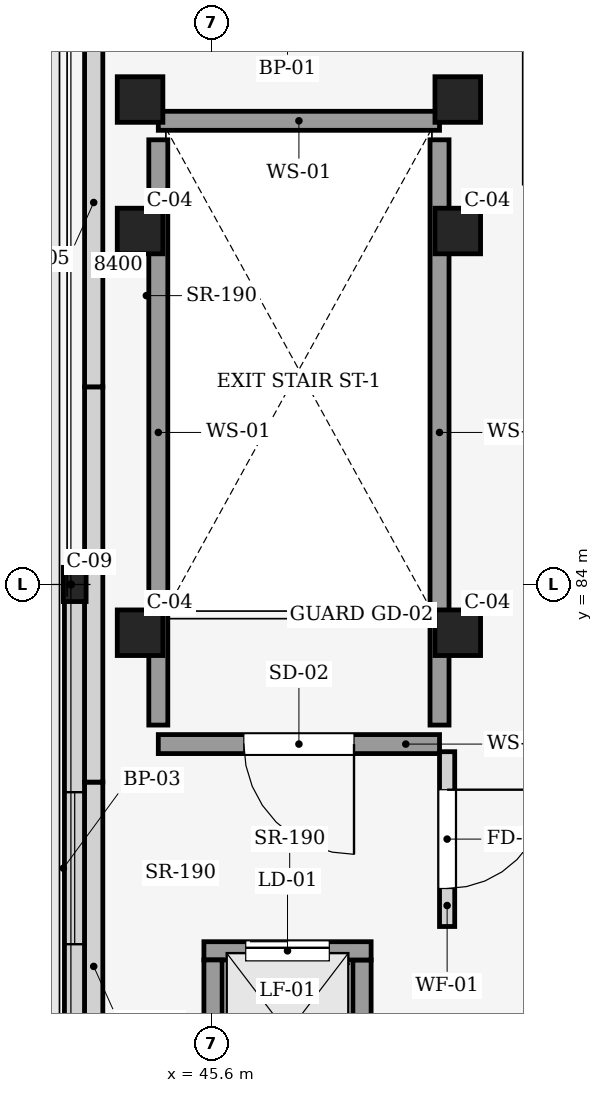
"""IFC4 building model, lengths in metres.
Left out: names, types, materials, properties, quantities, classifications, styles, units other than length and angle.
Written with IfcOpenShell. Run it as: python <this file> out.ifc"""

import sys

from ifc_helpers import new_model, si_unit, direction, frame, frame_2d, origin, origin_2d, place, context, subcontext, project, spatial, rectangle, i_section, extrude, element, fill, save


model = new_model("IFC4")
c1 = context("Model", 3, precision=1e-05, world=origin(), true_north=direction((0.0, 1.0)))
c2 = subcontext(c1, "Body", "Model", "MODEL_VIEW")
j1 = project(units=[si_unit("LENGTHUNIT", "METRE"), si_unit("PLANEANGLEUNIT", "RADIAN")], contexts=[c1])
p1 = place(None, origin())
s1 = spatial("IfcSite", under=j1, at=p1, CompositionType="ELEMENT")
p2 = place(p1, origin())
s2 = spatial("IfcBuilding", under=s1, at=p2, CompositionType="ELEMENT")
p3 = place(p2, frame((0.0, 0.0, 29.4)))
s3 = spatial("IfcBuildingStorey", under=s2, at=p3, CompositionType="ELEMENT", Elevation=29.4)
p4 = place(p3, frame((43.8, 84.0, 0.0), z_axis=(0.0, 0.0, 1.0), x_axis=(1.0, 0.0, 0.0)))
e1 = element("IfcColumn", 1, at=p4, inside=s3, PredefinedType="COLUMN", context=c2, shape_type="SweptSolid", body=[
    extrude(i_section(OverallWidth=0.3, OverallDepth=0.45, WebThickness=0.014, FlangeThickness=0.026, at=origin_2d()), origin(), (0.0, 0.0, 1.0), 9.96),
])
for number, where, z_axis, x_axis in (
    (2, (48.84, 83.365, 0.0), (0.0, 0.0, 1.0), (1.0, 0.0, 0.0)),
    (3, (44.66, 83.365, 0.0), (0.0, 0.0, 1.0), (1.0, 0.0, 0.0)),
    (4, (48.84, 88.65, 0.0), (0.0, 0.0, 1.0), (1.0, 0.0, 0.0)),
    (5, (44.66, 88.65, 0.0), (0.0, 0.0, 1.0), (1.0, 0.0, 0.0)),
    (6, (48.84, 90.38, 0.0), (0.0, 0.0, 1.0), (1.0, 0.0, 0.0)),
    (7, (44.66, 90.38, 0.0), (0.0, 0.0, 1.0), (1.0, 0.0, 0.0)),
):
    element("IfcColumn", number, at=place(p3, frame(where, z_axis=z_axis, x_axis=x_axis)), inside=s3, PredefinedType="COLUMN", context=c2, shape_type="SweptSolid", body=[
        extrude(rectangle(XDim=0.6, YDim=0.6, at=origin_2d()), origin(), (0.0, 0.0, 1.0), 4.75),
    ])
p5 = place(p3, frame((43.8, 76.685, 0.0), z_axis=(0.0, 0.0, 1.0), x_axis=(0.0, 1.0, 0.0)))
e8 = element("IfcWall", 8, at=p5, inside=s3, PredefinedType="STANDARD", context=c2, shape_type="SweptSolid", body=[
    extrude(rectangle(XDim=7.165, YDim=0.27, at=frame_2d((3.583, 0.0))), origin(), (0.0, 0.0, 1.0), 4.425),
])
p6 = place(p5, frame((2.582, 0.0, 0.85)))
e9 = element("IfcOpeningElement", 9, at=p6, cuts=e8, PredefinedType="OPENING", context=c2, shape_type="SweptSolid", body=[
    extrude(rectangle(XDim=2.0, YDim=1.85, at=frame_2d((1.0, 0.925))), frame((0.0, 0.145, 0.0), z_axis=(0.0, -1.0, 0.0), x_axis=(1.0, 0.0, 0.0)), (0.0, 0.0, 1.0), 0.29),
])
p7 = place(p3, frame((44.05, 76.55, 4.7), z_axis=(0.0, 0.0, 1.0), x_axis=(0.0, 1.0, 0.0)))
e10 = element("IfcWall", 10, at=p7, inside=s3, PredefinedType="STANDARD", context=c2, shape_type="SweptSolid", body=[
    extrude(rectangle(XDim=4.85, YDim=0.24, at=frame_2d((2.425, 0.0))), origin(), (0.0, 0.0, 1.0), 3.8),
])
p8 = place(p3, frame((44.05, 81.4, 4.7), z_axis=(0.0, 0.0, 1.0), x_axis=(0.0, 1.0, 0.0)))
e11 = element("IfcWall", 11, at=p8, inside=s3, PredefinedType="STANDARD", context=c2, shape_type="SweptSolid", body=[
    extrude(rectangle(XDim=5.2, YDim=0.24, at=frame_2d((2.6, 0.0))), origin(), (0.0, 0.0, 1.0), 4.85),
])
p9 = place(p3, frame((44.05, 86.6, 4.7), z_axis=(0.0, 0.0, 1.0), x_axis=(0.0, 1.0, 0.0)))
e12 = element("IfcWall", 12, at=p9, inside=s3, PredefinedType="STANDARD", context=c2, shape_type="SweptSolid", body=[
    extrude(rectangle(XDim=4.85, YDim=0.24, at=frame_2d((2.425, 0.0))), origin(), (0.0, 0.0, 1.0), 3.8),
])
p10 = place(p3, frame((48.6, 81.9, 0.0), z_axis=(0.0, 0.0, 1.0), x_axis=(-1.0, 0.0, 0.0)))
e13 = element("IfcWall", 13, at=p10, inside=s3, PredefinedType="SHEAR", context=c2, shape_type="SweptSolid", body=[
    extrude(rectangle(XDim=3.7, YDim=0.25, at=frame_2d((1.85, 0.0))), origin(), (0.0, 0.0, 1.0), 4.75),
])
p11 = place(p10, frame((1.125, 0.0, 0.0)))
e14 = element("IfcOpeningElement", 14, at=p11, cuts=e13, PredefinedType="OPENING", context=c2, shape_type="SweptSolid", body=[
    extrude(rectangle(XDim=1.45, YDim=2.2, at=frame_2d((0.725, 1.1))), frame((0.0, 0.135, 0.0), z_axis=(0.0, -1.0, 0.0), x_axis=(1.0, 0.0, 0.0)), (0.0, 0.0, 1.0), 0.27),
])
p12 = place(p3, frame((44.9, 82.15, 0.0), z_axis=(0.0, 0.0, 1.0), x_axis=(0.0, 1.0, 0.0)))
e15 = element("IfcWall", 15, at=p12, inside=s3, PredefinedType="SHEAR", context=c2, shape_type="SweptSolid", body=[
    extrude(rectangle(XDim=7.7, YDim=0.25, at=frame_2d((3.85, 0.0))), origin(), (0.0, 0.0, 1.0), 4.75),
])
p13 = place(p3, frame((44.9, 90.1, 0.0), z_axis=(0.0, 0.0, 1.0), x_axis=(1.0, 0.0, 0.0)))
e16 = element("IfcWall", 16, at=p13, inside=s3, PredefinedType="SHEAR", context=c2, shape_type="SweptSolid", body=[
    extrude(rectangle(XDim=3.7, YDim=0.25, at=frame_2d((1.85, 0.0))), origin(), (0.0, 0.0, 1.0), 4.75),
])
p14 = place(p3, frame((48.6, 89.85, 0.0), z_axis=(0.0, 0.0, 1.0), x_axis=(0.0, -1.0, 0.0)))
e17 = element("IfcWall", 17, at=p14, inside=s3, PredefinedType="SHEAR", context=c2, shape_type="SweptSolid", body=[
    extrude(rectangle(XDim=7.7, YDim=0.25, at=frame_2d((3.85, 0.0))), origin(), (0.0, 0.0, 1.0), 4.75),
])
p15 = place(p3, frame((47.58, 79.06, 0.0), z_axis=(0.0, 0.0, 1.0), x_axis=(0.0, -1.0, 0.0)))
e18 = element("IfcWall", 18, at=p15, inside=s3, PredefinedType="SHEAR", context=c2, shape_type="SweptSolid", body=[
    extrude(rectangle(XDim=1.92, YDim=0.24, at=frame_2d((0.96, 0.0))), origin(), (0.0, 0.0, 1.0), 4.75),
])
p16 = place(p3, frame((45.5, 79.18, 0.0), z_axis=(0.0, 0.0, 1.0), x_axis=(1.0, 0.0, 0.0)))
e19 = element("IfcWall", 19, at=p16, inside=s3, PredefinedType="SHEAR", context=c2, shape_type="SweptSolid", body=[
    extrude(rectangle(XDim=2.2, YDim=0.24, at=frame_2d((1.1, 0.0))), origin(), (0.0, 0.0, 1.0), 4.75),
])
p17 = place(p16, frame((0.55, 0.0, 0.0)))
e20 = element("IfcOpeningElement", 20, at=p17, cuts=e19, PredefinedType="OPENING", context=c2, shape_type="SweptSolid", body=[
    extrude(rectangle(XDim=1.1, YDim=2.15, at=frame_2d((0.55, 1.075))), frame((0.0, 0.13, 0.0), z_axis=(0.0, -1.0, 0.0), x_axis=(1.0, 0.0, 0.0)), (0.0, 0.0, 1.0), 0.26),
])
p18 = place(p3, frame((45.62, 77.14, 0.0), z_axis=(0.0, 0.0, 1.0), x_axis=(0.0, 1.0, 0.0)))
e21 = element("IfcWall", 21, at=p18, inside=s3, PredefinedType="SHEAR", context=c2, shape_type="SweptSolid", body=[
    extrude(rectangle(XDim=1.92, YDim=0.24, at=frame_2d((0.96, 0.0))), origin(), (0.0, 0.0, 1.0), 4.75),
])
p19 = place(p3, frame((48.7, 81.8, 0.0), z_axis=(0.0, 0.0, 1.0), x_axis=(0.0, -1.0, 0.0)))
e22 = element("IfcWall", 22, at=p19, inside=s3, PredefinedType="PARTITIONING", context=c2, shape_type="SweptSolid", body=[
    extrude(rectangle(XDim=2.3, YDim=0.2, at=frame_2d((1.15, 0.0))), origin(), (0.0, 0.0, 1.0), 2.9),
])
p20 = place(p19, frame((0.5, 0.0, 0.0)))
e23 = element("IfcOpeningElement", 23, at=p20, cuts=e22, PredefinedType="OPENING", context=c2, shape_type="SweptSolid", body=[
    extrude(rectangle(XDim=1.3, YDim=2.2, at=frame_2d((0.65, 1.1))), frame((0.0, 0.11, 0.0), z_axis=(0.0, -1.0, 0.0), x_axis=(1.0, 0.0, 0.0)), (0.0, 0.0, 1.0), 0.22),
])
p21 = place(p6, origin())
e24 = element("IfcWindow", 24, at=p21, inside=s3, PartitioningType="SINGLE_PANEL", PredefinedType="WINDOW", context=c2, shape_type="SweptSolid", body=[
    extrude(rectangle(XDim=2.0, YDim=1.85, at=frame_2d((1.0, 0.925))), frame((0.0, 0.03, 0.0), z_axis=(0.0, -1.0, 0.0), x_axis=(1.0, 0.0, 0.0)), (0.0, 0.0, 1.0), 0.06),
])
fill(e9, e24)
p22 = place(p11, origin())
e25 = element("IfcDoor", 25, at=p22, inside=s3, OperationType="SINGLE_SWING_LEFT", PredefinedType="DOOR", context=c2, shape_type="SweptSolid", body=[
    extrude(rectangle(XDim=1.45, YDim=2.2, at=frame_2d((0.725, 1.1))), frame((0.0, 0.025, 0.0), z_axis=(0.0, -1.0, 0.0), x_axis=(1.0, 0.0, 0.0)), (0.0, 0.0, 1.0), 0.05),
])
fill(e14, e25)
p23 = place(p17, origin())
e26 = element("IfcDoor", 26, at=p23, inside=s3, OperationType="SLIDING_TO_LEFT", PredefinedType="DOOR", context=c2, shape_type="SweptSolid", body=[
    extrude(rectangle(XDim=1.1, YDim=2.15, at=frame_2d((0.55, 1.075))), frame((0.0, 0.025, 0.0), z_axis=(0.0, -1.0, 0.0), x_axis=(1.0, 0.0, 0.0)), (0.0, 0.0, 1.0), 0.05),
])
fill(e20, e26)
p24 = place(p20, origin())
e27 = element("IfcDoor", 27, at=p24, inside=s3, OperationType="SINGLE_SWING_LEFT", PredefinedType="DOOR", context=c2, shape_type="SweptSolid", body=[
    extrude(rectangle(XDim=1.3, YDim=2.2, at=frame_2d((0.65, 1.1))), frame((0.0, 0.025, 0.0), z_axis=(0.0, -1.0, 0.0), x_axis=(1.0, 0.0, 0.0)), (0.0, 0.0, 1.0), 0.05),
])
fill(e23, e27)
save(model, sys.argv[1])
